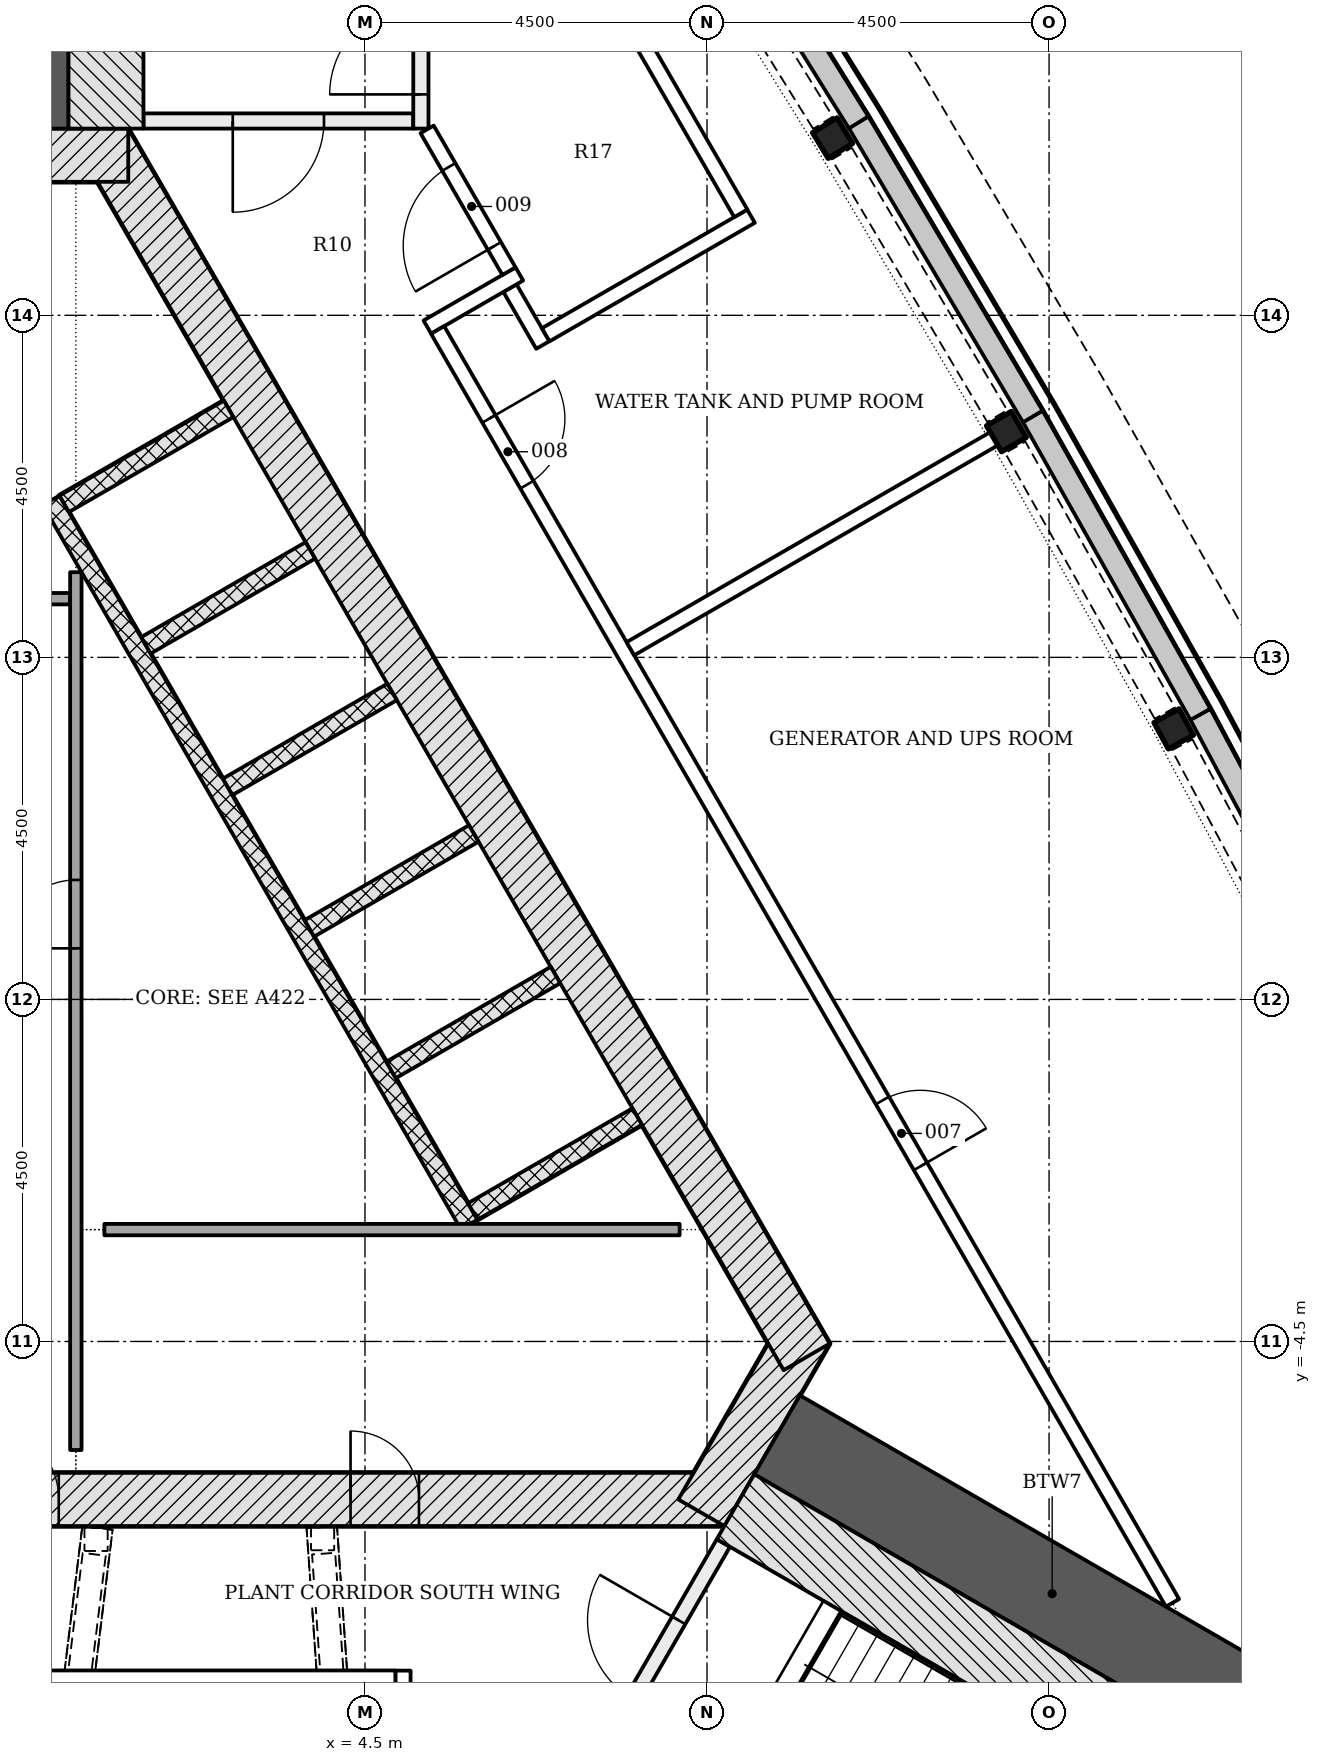
"""IFC4 building model, lengths in metres.
Left out: names, types, materials, properties, quantities, classifications, styles, units other than length and angle.
Written with IfcOpenShell. Run it as: python <this file> out.ifc"""

import sys

from ifc_helpers import new_model, si_unit, direction, frame, frame_2d, origin, origin_2d, place, context, subcontext, project, spatial, polyline, rectangle, i_section, outline, extrude, element, fill, save


model = new_model("IFC4")
c1 = context("Model", 3, precision=1e-05, world=origin(), true_north=direction((0.0, 1.0)))
c2 = subcontext(c1, "Body", "Model", "MODEL_VIEW")
j1 = project(units=[si_unit("LENGTHUNIT", "METRE"), si_unit("PLANEANGLEUNIT", "RADIAN")], contexts=[c1])
p1 = place(None, origin())
s1 = spatial("IfcSite", under=j1, at=p1, CompositionType="ELEMENT")
p2 = place(p1, origin())
s2 = spatial("IfcBuilding", under=s1, at=p2, CompositionType="ELEMENT")
p3 = place(p2, frame((0.0, 0.0, 210.3)))
s3 = spatial("IfcBuildingStorey", under=s2, at=p3, CompositionType="ELEMENT", Elevation=210.3)
p4 = place(p3, frame((-9.229, -6.578, -0.3), z_axis=(0.0, 0.0, 1.0), x_axis=(1.0, 0.0, 0.0)))
e1 = element("IfcWall", 1, at=p4, inside=s3, PredefinedType="SHEAR", context=c2, shape_type="SweptSolid", body=[
    extrude(rectangle(XDim=18.458, YDim=0.7, at=frame_2d((9.229, 0.0))), origin(), (0.0, 0.0, 1.0), 4.6),
])
p5 = place(p4, frame((8.7, 0.0, 0.3)))
e2 = element("IfcOpeningElement", 2, at=p5, cuts=e1, PredefinedType="OPENING", context=c2, shape_type="SweptSolid", body=[
    extrude(rectangle(XDim=1.0, YDim=2.1, at=frame_2d((0.5, 1.05))), frame((0.0, 0.36, 0.0), z_axis=(0.0, -1.0, 0.0), x_axis=(1.0, 0.0, 0.0)), (0.0, 0.0, 1.0), 0.72),
])
p6 = place(p4, frame((3.99, 0.0, 0.3)))
e3 = element("IfcOpeningElement", 3, at=p6, cuts=e1, PredefinedType="OPENING", context=c2, shape_type="SweptSolid", body=[
    extrude(rectangle(XDim=0.9, YDim=2.1, at=frame_2d((0.45, 1.05))), frame((0.0, 0.36, 0.0), z_axis=(0.0, -1.0, 0.0), x_axis=(1.0, 0.0, 0.0)), (0.0, 0.0, 1.0), 0.72),
])
p7 = place(p4, frame((13.539, 0.0, 0.3)))
e4 = element("IfcOpeningElement", 4, at=p7, cuts=e1, PredefinedType="OPENING", context=c2, shape_type="SweptSolid", body=[
    extrude(rectangle(XDim=0.9, YDim=2.1, at=frame_2d((0.45, 1.05))), frame((0.0, 0.36, 0.0), z_axis=(0.0, -1.0, 0.0), x_axis=(1.0, 0.0, 0.0)), (0.0, 0.0, 1.0), 0.72),
])
p8 = place(p3, frame((8.926, -6.753, -0.3), z_axis=(0.0, 0.0, 1.0), x_axis=(0.500042739161, 0.866000726912, 0.0)))
e5 = element("IfcWall", 5, at=p8, inside=s3, PredefinedType="SHEAR", context=c2, shape_type="SweptSolid", body=[
    extrude(rectangle(XDim=2.771, YDim=0.7, at=frame_2d((1.386, 0.0))), origin(), (0.0, 0.0, 1.0), 4.6),
])
p9 = place(p3, frame((10.311, -4.703, -0.3), z_axis=(0.0, 0.0, 1.0), x_axis=(-0.500001446645, 0.866024568562, 0.0)))
e6 = element("IfcWall", 6, at=p9, inside=s3, PredefinedType="SHEAR", context=c2, shape_type="SweptSolid", body=[
    extrude(rectangle(XDim=18.458, YDim=0.7, at=frame_2d((9.229, 0.0))), origin(), (0.0, 0.0, 1.0), 4.6),
])
p10 = place(p3, frame((1.386, 11.106, -0.3), z_axis=(0.0, 0.0, 1.0), x_axis=(-1.0, 0.0, 0.0)))
e7 = element("IfcWall", 7, at=p10, inside=s3, PredefinedType="SHEAR", context=c2, shape_type="SweptSolid", body=[
    extrude(rectangle(XDim=2.771, YDim=0.7, at=frame_2d((1.386, 0.0))), origin(), (0.0, 0.0, 1.0), 4.6),
])
for number, where, z_axis, x_axis in (
    (8, (0.0, 11.456, -0.3), (0.0, 0.0, 1.0), (0.0, 1.0, 0.0)),
    (9, (9.922, -5.728, -0.3), (0.0, 0.0, 1.0), (0.866, -0.5, 0.0)),
):
    element("IfcWall", number, at=place(p3, frame(where, z_axis=z_axis, x_axis=x_axis)), inside=s3, PredefinedType="SHEAR", context=c2, shape_type="SweptSolid", body=[
        extrude(rectangle(XDim=8.359, YDim=1.2, at=frame_2d((4.179, 0.0))), origin(), (0.0, 0.0, 1.0), 4.6),
    ])
for number, where, z_axis, x_axis in (
    (10, (15.14, 3.559, -0.3), (0.0, 0.0, 1.0), (-0.481, 0.877, 0.0)),
    (11, (12.939, 7.47, -0.3), (0.0, 0.0, 1.0), (-0.5, 0.866, 0.0)),
    (12, (10.652, 11.332, -0.3), (0.0, 0.0, 1.0), (-0.519, 0.855, 0.0)),
):
    element("IfcColumn", number, at=place(p3, frame(where, z_axis=z_axis, x_axis=x_axis)), inside=s3, PredefinedType="COLUMN", context=c2, shape_type="SweptSolid", body=[
        extrude(i_section(OverallWidth=0.394, OverallDepth=0.376, WebThickness=0.017, FlangeThickness=0.028, FilletRadius=0.015, at=origin_2d()), origin(), (0.0, 0.0, 1.0), 4.6),
    ])
p11 = place(p3, origin())
e13 = element("IfcWall", 13, at=p11, inside=s3, PredefinedType="NOTDEFINED", context=c2, shape_type="SweptSolid", body=[
    extrude(outline(polyline([(17.741, -0.146), (15.622, 3.823), (15.357, 3.682), (17.477, -0.287), (17.741, -0.146)])), origin(), (0.0, 0.0, 1.0), 1.2),
])
p12 = place(p3, origin())
e14 = element("IfcWall", 14, at=p12, inside=s3, PredefinedType="NOTDEFINED", context=c2, shape_type="SweptSolid", body=[
    extrude(outline(polyline([(15.622, 3.823), (13.415, 7.745), (13.154, 7.598), (15.36, 3.677), (15.622, 3.823)])), origin(), (0.0, 0.0, 1.0), 1.2),
])
p13 = place(p3, origin())
e15 = element("IfcWall", 15, at=p13, inside=s3, PredefinedType="NOTDEFINED", context=c2, shape_type="SweptSolid", body=[
    extrude(outline(polyline([(13.415, 7.745), (11.122, 11.617), (10.864, 11.464), (13.157, 7.592), (13.415, 7.745)])), origin(), (0.0, 0.0, 1.0), 1.2),
])
p14 = place(p3, origin())
e16 = element("IfcWall", 16, at=p14, inside=s3, PredefinedType="NOTDEFINED", context=c2, shape_type="SweptSolid", body=[
    extrude(outline(polyline([(11.122, 11.617), (8.744, 15.437), (8.49, 15.279), (10.867, 11.458), (11.122, 11.617)])), origin(), (0.0, 0.0, 1.0), 1.2),
])
p15 = place(p3, origin())
e17 = element("IfcWall", 17, at=p15, inside=s3, PredefinedType="NOTDEFINED", context=c2, shape_type="SweptSolid", body=[
    extrude(outline(polyline([(13.49, -15.042), (15.507, -14.898), (16.988, -14.602), (18.354, -13.958), (19.526, -13.004), (20.434, -11.797), (21.025, -10.408), (21.265, -8.917), (21.139, -7.411), (20.656, -5.98), (19.772, -4.162), (19.502, -4.293), (20.378, -6.094), (20.844, -7.473), (20.963, -8.905), (20.735, -10.324), (20.172, -11.646), (19.308, -12.795), (18.193, -13.702), (16.893, -14.315), (15.467, -14.6), (13.469, -14.743), (13.49, -15.042)])), origin(), (0.0, 0.0, 1.0), 4.3),
])
for number, where, z_axis, x_axis in (
    (18, (8.081, -1.541, -0.3), (0.0, 0.0, 1.0), (-0.866, -0.5, 0.0)),
    (19, (7.006, 0.321, -0.3), (0.0, 0.0, 1.0), (-0.866, -0.5, 0.0)),
):
    element("IfcWall", number, at=place(p3, frame(where, z_axis=z_axis, x_axis=x_axis)), inside=s3, PredefinedType="PARTITIONING", context=c2, shape_type="SweptSolid", body=[
        extrude(rectangle(XDim=2.5, YDim=0.25, at=frame_2d((1.25, 0.0))), origin(), (0.0, 0.0, 1.0), 4.6),
    ])
p16 = place(p3, frame((5.931, 2.183, -0.3), z_axis=(0.0, 0.0, 1.0), x_axis=(-0.866047370643, -0.499961950354, 0.0)))
e20 = element("IfcWall", 20, at=p16, inside=s3, PredefinedType="PARTITIONING", context=c2, shape_type="SweptSolid", body=[
    extrude(rectangle(XDim=2.5, YDim=0.25, at=frame_2d((1.25, 0.0))), origin(), (0.0, 0.0, 1.0), 4.6),
])
for number, where, z_axis, x_axis in (
    (21, (4.856, 4.045, -0.3), (0.0, 0.0, 1.0), (-0.866, -0.5, 0.0)),
    (22, (3.781, 5.907, -0.3), (0.0, 0.0, 1.0), (-0.866, -0.5, 0.0)),
    (23, (2.706, 7.769, -0.3), (0.0, 0.0, 1.0), (-0.866, -0.5, 0.0)),
):
    element("IfcWall", number, at=place(p3, frame(where, z_axis=z_axis, x_axis=x_axis)), inside=s3, PredefinedType="PARTITIONING", context=c2, shape_type="SweptSolid", body=[
        extrude(rectangle(XDim=2.5, YDim=0.25, at=frame_2d((1.25, 0.0))), origin(), (0.0, 0.0, 1.0), 4.6),
    ])
p17 = place(p3, frame((5.87, -2.961, 0.0), z_axis=(0.0, 0.0, 1.0), x_axis=(-0.50000615651, 0.866021849293, 0.0)))
e24 = element("IfcWall", 24, at=p17, inside=s3, PredefinedType="PARTITIONING", context=c2, shape_type="SweptSolid", body=[
    extrude(rectangle(XDim=11.0, YDim=0.25, at=frame_2d((5.5, 0.0))), origin(), (0.0, 0.0, 1.0), 4.3),
])
p18 = place(p3, frame((-0.679, 5.272, 0.0), z_axis=(0.0, 0.0, 1.0), x_axis=(1.0, 0.0, 0.0)))
e25 = element("IfcWall", 25, at=p18, inside=s3, PredefinedType="PARTITIONING", context=c2, shape_type="SweptSolid", body=[
    extrude(rectangle(XDim=1.3, YDim=0.15, at=frame_2d((0.65, 0.0))), origin(), (0.0, 0.0, 1.0), 4.3),
])
p19 = place(p3, frame((0.696, -5.928, 0.0), z_axis=(0.0, 0.0, 1.0), x_axis=(0.0, 1.0, 0.0)))
e26 = element("IfcWall", 26, at=p19, inside=s3, PredefinedType="PARTITIONING", context=c2, shape_type="SweptSolid", body=[
    extrude(rectangle(XDim=11.549, YDim=0.15, at=frame_2d((5.774, 0.0))), origin(), (0.0, 0.0, 1.0), 4.3),
])
p20 = place(p19, frame((6.6, 0.0, 0.0)))
e27 = element("IfcOpeningElement", 27, at=p20, cuts=e26, PredefinedType="OPENING", context=c2, shape_type="SweptSolid", body=[
    extrude(rectangle(XDim=0.9, YDim=2.1, at=frame_2d((0.45, 1.05))), frame((0.0, 0.085, 0.0), z_axis=(0.0, -1.0, 0.0), x_axis=(1.0, 0.0, 0.0)), (0.0, 0.0, 1.0), 0.17),
])
p21 = place(p3, frame((1.071, -3.028, 0.0), z_axis=(0.0, 0.0, 1.0), x_axis=(1.0, 0.0, 0.0)))
e28 = element("IfcWall", 28, at=p21, inside=s3, PredefinedType="PARTITIONING", context=c2, shape_type="SweptSolid", body=[
    extrude(rectangle(XDim=7.569, YDim=0.15, at=frame_2d((3.784, 0.0))), origin(), (0.0, 0.0, 1.0), 4.3),
])
p22 = place(p3, frame((5.135, 11.556, -0.3), z_axis=(0.0, 0.0, 1.0), x_axis=(-1.0, 0.0, 0.0)))
e29 = element("IfcWall", 29, at=p22, inside=s3, PredefinedType="SHEAR", context=c2, shape_type="SweptSolid", body=[
    extrude(rectangle(XDim=3.55, YDim=0.2, at=frame_2d((1.775, 0.0))), origin(), (0.0, 0.0, 1.0), 4.6),
])
p23 = place(p22, frame((1.175, 0.0, 0.3)))
e30 = element("IfcOpeningElement", 30, at=p23, cuts=e29, PredefinedType="OPENING", context=c2, shape_type="SweptSolid", body=[
    extrude(rectangle(XDim=1.2, YDim=2.1, at=frame_2d((0.6, 1.05))), frame((0.0, 0.11, 0.0), z_axis=(0.0, -1.0, 0.0), x_axis=(1.0, 0.0, 0.0)), (0.0, 0.0, 1.0), 0.22),
])
p24 = place(p3, frame((5.236, 11.456, -0.3), z_axis=(0.0, 0.0, 1.0), x_axis=(0.0, 1.0, 0.0)))
e31 = element("IfcWall", 31, at=p24, inside=s3, PredefinedType="SHEAR", context=c2, shape_type="SweptSolid", body=[
    extrude(rectangle(XDim=5.6, YDim=0.2, at=frame_2d((2.8, 0.0))), origin(), (0.0, 0.0, 1.0), 4.6),
])
p25 = place(p24, frame((0.45, 0.0, 0.3)))
e32 = element("IfcOpeningElement", 32, at=p25, cuts=e31, PredefinedType="OPENING", context=c2, shape_type="SweptSolid", body=[
    extrude(rectangle(XDim=1.2, YDim=2.1, at=frame_2d((0.6, 1.05))), frame((0.0, 0.11, 0.0), z_axis=(0.0, -1.0, 0.0), x_axis=(1.0, 0.0, 0.0)), (0.0, 0.0, 1.0), 0.22),
])
p26 = place(p3, frame((1.093, 11.456, -0.3), z_axis=(0.0, 0.0, 1.0), x_axis=(0.0, 1.0, 0.0)))
e33 = element("IfcWall", 33, at=p26, inside=s3, PredefinedType="SHEAR", context=c2, shape_type="SweptSolid", body=[
    extrude(rectangle(XDim=7.2, YDim=0.986, at=frame_2d((3.6, 0.0))), origin(), (0.0, 0.0, 1.0), 4.6),
])
p27 = place(p3, frame((7.44, -10.226, -0.3), z_axis=(0.0, 0.0, 1.0), x_axis=(0.500022077904, 0.866012656725, 0.0)))
e34 = element("IfcWall", 34, at=p27, inside=s3, PredefinedType="SHEAR", context=c2, shape_type="SweptSolid", body=[
    extrude(rectangle(XDim=3.55, YDim=0.2, at=frame_2d((1.775, 0.0))), origin(), (0.0, 0.0, 1.0), 4.6),
])
p28 = place(p27, frame((1.175, 0.0, 0.3)))
e35 = element("IfcOpeningElement", 35, at=p28, cuts=e34, PredefinedType="OPENING", context=c2, shape_type="SweptSolid", body=[
    extrude(rectangle(XDim=1.2, YDim=2.1, at=frame_2d((0.6, 1.05))), frame((0.0, 0.11, 0.0), z_axis=(0.0, -1.0, 0.0), x_axis=(1.0, 0.0, 0.0)), (0.0, 0.0, 1.0), 0.22),
])
p29 = place(p3, frame((9.375, -6.675, -0.3), z_axis=(0.0, 0.0, 1.0), x_axis=(0.866026919366, -0.499997374926, 0.0)))
e36 = element("IfcWall", 36, at=p29, inside=s3, PredefinedType="SHEAR", context=c2, shape_type="SweptSolid", body=[
    extrude(rectangle(XDim=7.2, YDim=0.986, at=frame_2d((3.6, 0.0))), origin(), (0.0, 0.0, 1.0), 4.6),
])
p30 = place(p3, frame((5.0, -10.428, 0.0), z_axis=(0.0, 0.0, 1.0), x_axis=(0.0, 1.0, 0.0)))
e37 = element("IfcWall", 37, at=p30, inside=s3, PredefinedType="PARTITIONING", context=c2, shape_type="SweptSolid", body=[
    extrude(rectangle(XDim=1.598, YDim=0.2, at=frame_2d((0.799, 0.0))), origin(), (0.0, 0.0, 1.0), 4.3),
])
p31 = place(p3, frame((-14.091, -8.928, 0.0), z_axis=(0.0, 0.0, 1.0), x_axis=(1.0, 0.0, 0.0)))
e38 = element("IfcWall", 38, at=p31, inside=s3, PredefinedType="PARTITIONING", context=c2, shape_type="SweptSolid", body=[
    extrude(rectangle(XDim=18.991, YDim=0.2, at=frame_2d((9.495, 0.0))), origin(), (0.0, 0.0, 1.0), 4.3),
])
p32 = place(p31, frame((10.411, 0.0, 0.0)))
e39 = element("IfcOpeningElement", 39, at=p32, cuts=e38, PredefinedType="OPENING", context=c2, shape_type="SweptSolid", body=[
    extrude(rectangle(XDim=1.0, YDim=2.1, at=frame_2d((0.5, 1.05))), frame((0.0, 0.11, 0.0), z_axis=(0.0, -1.0, 0.0), x_axis=(1.0, 0.0, 0.0)), (0.0, 0.0, 1.0), 0.22),
])
p33 = place(p3, frame((6.408, 9.358, 0.0), z_axis=(0.0, 0.0, 1.0), x_axis=(0.49996696679, -0.866044474677, 0.0)))
e40 = element("IfcWall", 40, at=p33, inside=s3, PredefinedType="PARTITIONING", context=c2, shape_type="SweptSolid", body=[
    extrude(rectangle(XDim=0.864, YDim=0.2, at=frame_2d((0.432, 0.0))), origin(), (0.0, 0.0, 1.0), 3.752),
])
p34 = place(p3, frame((5.32, 8.845, 0.0), z_axis=(0.0, 0.0, 1.0), x_axis=(0.866031452229, 0.49998952364, 0.0)))
e41 = element("IfcWall", 41, at=p34, inside=s3, PredefinedType="PARTITIONING", context=c2, shape_type="SweptSolid", body=[
    extrude(rectangle(XDim=1.398, YDim=0.2, at=frame_2d((0.699, 0.0))), origin(), (0.0, 0.0, 1.0), 4.3),
])
p35 = place(p3, frame((6.395, 9.581, 0.0), z_axis=(0.0, 0.0, 1.0), x_axis=(-0.500003735859, 0.866023246874, 0.0)))
e42 = element("IfcWall", 42, at=p35, inside=s3, PredefinedType="PARTITIONING", context=c2, shape_type="SweptSolid", body=[
    extrude(rectangle(XDim=2.154, YDim=0.2, at=frame_2d((1.077, 0.0))), origin(), (0.0, 0.0, 1.0), 4.3),
])
p36 = place(p35, frame((0.383, 0.0, 0.0)))
e43 = element("IfcOpeningElement", 43, at=p36, cuts=e42, PredefinedType="OPENING", context=c2, shape_type="SweptSolid", body=[
    extrude(rectangle(XDim=1.2, YDim=2.1, at=frame_2d((0.6, 1.05))), frame((0.0, 0.11, 0.0), z_axis=(0.0, -1.0, 0.0), x_axis=(1.0, 0.0, 0.0)), (0.0, 0.0, 1.0), 0.22),
])
p37 = place(p3, frame((5.455, 8.808, 0.0), z_axis=(0.0, 0.0, 1.0), x_axis=(0.49999276215, -0.866029582519, 0.0)))
e44 = element("IfcWall", 44, at=p37, inside=s3, PredefinedType="PARTITIONING", context=c2, shape_type="SweptSolid", body=[
    extrude(rectangle(XDim=19.337, YDim=0.2, at=frame_2d((9.668, 0.0))), origin(), (0.0, 0.0, 1.0), 3.752),
])
p38 = place(p37, frame((11.705, 0.0, 0.0)))
e45 = element("IfcOpeningElement", 45, at=p38, cuts=e44, PredefinedType="OPENING", context=c2, shape_type="SweptSolid", body=[
    extrude(rectangle(XDim=1.0, YDim=2.1, at=frame_2d((0.5, 1.05))), frame((0.0, 0.11, 0.0), z_axis=(0.0, -1.0, 0.0), x_axis=(1.0, 0.0, 0.0)), (0.0, 0.0, 1.0), 0.22),
])
p39 = place(p37, frame((1.351, 0.0, 0.0)))
e46 = element("IfcOpeningElement", 46, at=p39, cuts=e44, PredefinedType="OPENING", context=c2, shape_type="SweptSolid", body=[
    extrude(rectangle(XDim=1.0, YDim=2.1, at=frame_2d((0.5, 1.05))), frame((0.0, 0.11, 0.0), z_axis=(0.0, -1.0, 0.0), x_axis=(1.0, 0.0, 0.0)), (0.0, 0.0, 1.0), 0.22),
])
p40 = place(p3, frame((7.992, 4.614, 0.0), z_axis=(0.0, 0.0, 1.0), x_axis=(0.866008693241, 0.500028942393, 0.0)))
e47 = element("IfcWall", 47, at=p40, inside=s3, PredefinedType="PARTITIONING", context=c2, shape_type="SweptSolid", body=[
    extrude(rectangle(XDim=5.562, YDim=0.2, at=frame_2d((2.781, 0.0))), origin(), (0.0, 0.0, 1.0), 3.752),
])
p41 = place(p3, frame((6.878, 8.744, 0.0), z_axis=(0.0, 0.0, 1.0), x_axis=(0.866023983177, 0.500002460556, 0.0)))
e48 = element("IfcWall", 48, at=p41, inside=s3, PredefinedType="PARTITIONING", context=c2, shape_type="SweptSolid", body=[
    extrude(rectangle(XDim=3.12, YDim=0.2, at=frame_2d((1.56, 0.0))), origin(), (0.0, 0.0, 1.0), 4.3),
])
p42 = place(p3, frame((6.566, 15.327, 0.0), z_axis=(0.0, 0.0, 1.0), x_axis=(0.499997778408, -0.866026686418, 0.0)))
e49 = element("IfcWall", 49, at=p42, inside=s3, PredefinedType="PARTITIONING", context=c2, shape_type="SweptSolid", body=[
    extrude(rectangle(XDim=5.757, YDim=0.2, at=frame_2d((2.878, 0.0))), origin(), (0.0, 0.0, 1.0), 3.752),
])
p43 = place(p5, origin())
e50 = element("IfcDoor", 50, at=p43, inside=s3, OperationType="SINGLE_SWING_LEFT", PredefinedType="DOOR", context=c2, shape_type="SweptSolid", body=[
    extrude(rectangle(XDim=1.0, YDim=2.1, at=frame_2d((0.5, 1.05))), frame((0.0, 0.075, 0.0), z_axis=(0.0, -1.0, 0.0), x_axis=(1.0, 0.0, 0.0)), (0.0, 0.0, 1.0), 0.15),
])
fill(e2, e50)
p44 = place(p7, origin())
e51 = element("IfcDoor", 51, at=p44, inside=s3, OperationType="SINGLE_SWING_LEFT", PredefinedType="DOOR", context=c2, shape_type="SweptSolid", body=[
    extrude(rectangle(XDim=0.9, YDim=2.1, at=frame_2d((0.45, 1.05))), frame((0.0, 0.075, 0.0), z_axis=(0.0, -1.0, 0.0), x_axis=(1.0, 0.0, 0.0)), (0.0, 0.0, 1.0), 0.15),
])
fill(e4, e51)
p45 = place(p20, origin())
e52 = element("IfcDoor", 52, at=p45, inside=s3, OperationType="SINGLE_SWING_LEFT", PredefinedType="DOOR", context=c2, shape_type="SweptSolid", body=[
    extrude(rectangle(XDim=0.9, YDim=2.1, at=frame_2d((0.45, 1.05))), frame((0.0, 0.025, 0.0), z_axis=(0.0, -1.0, 0.0), x_axis=(1.0, 0.0, 0.0)), (0.0, 0.0, 1.0), 0.05),
])
fill(e27, e52)
p46 = place(p23, origin())
e53 = element("IfcDoor", 53, at=p46, inside=s3, OperationType="SINGLE_SWING_RIGHT", PredefinedType="DOOR", context=c2, shape_type="SweptSolid", body=[
    extrude(rectangle(XDim=1.2, YDim=2.1, at=frame_2d((0.6, 1.05))), frame((0.0, 0.025, 0.0), z_axis=(0.0, -1.0, 0.0), x_axis=(1.0, 0.0, 0.0)), (0.0, 0.0, 1.0), 0.05),
])
fill(e30, e53)
p47 = place(p25, origin())
e54 = element("IfcDoor", 54, at=p47, inside=s3, OperationType="SINGLE_SWING_LEFT", PredefinedType="DOOR", context=c2, shape_type="SweptSolid", body=[
    extrude(rectangle(XDim=1.2, YDim=2.1, at=frame_2d((0.6, 1.05))), frame((0.0, 0.025, 0.0), z_axis=(0.0, -1.0, 0.0), x_axis=(1.0, 0.0, 0.0)), (0.0, 0.0, 1.0), 0.05),
])
fill(e32, e54)
p48 = place(p28, origin())
e55 = element("IfcDoor", 55, at=p48, inside=s3, OperationType="SINGLE_SWING_RIGHT", PredefinedType="DOOR", context=c2, shape_type="SweptSolid", body=[
    extrude(rectangle(XDim=1.2, YDim=2.1, at=frame_2d((0.6, 1.05))), frame((0.0, 0.025, 0.0), z_axis=(0.0, -1.0, 0.0), x_axis=(1.0, 0.0, 0.0)), (0.0, 0.0, 1.0), 0.05),
])
fill(e35, e55)
p49 = place(p38, origin())
e56 = element("IfcDoor", 56, at=p49, inside=s3, OperationType="SINGLE_SWING_RIGHT", PredefinedType="DOOR", context=c2, shape_type="SweptSolid", body=[
    extrude(rectangle(XDim=1.0, YDim=2.1, at=frame_2d((0.5, 1.05))), frame((0.0, 0.025, 0.0), z_axis=(0.0, -1.0, 0.0), x_axis=(1.0, 0.0, 0.0)), (0.0, 0.0, 1.0), 0.05),
])
fill(e45, e56)
p50 = place(p39, origin())
e57 = element("IfcDoor", 57, at=p50, inside=s3, OperationType="SINGLE_SWING_LEFT", PredefinedType="DOOR", context=c2, shape_type="SweptSolid", body=[
    extrude(rectangle(XDim=1.0, YDim=2.1, at=frame_2d((0.5, 1.05))), frame((0.0, 0.025, 0.0), z_axis=(0.0, -1.0, 0.0), x_axis=(1.0, 0.0, 0.0)), (0.0, 0.0, 1.0), 0.05),
])
fill(e46, e57)
p51 = place(p36, origin())
e58 = element("IfcDoor", 58, at=p51, inside=s3, OperationType="SINGLE_SWING_LEFT", PredefinedType="DOOR", context=c2, shape_type="SweptSolid", body=[
    extrude(rectangle(XDim=1.2, YDim=2.1, at=frame_2d((0.6, 1.05))), frame((0.0, 0.025, 0.0), z_axis=(0.0, -1.0, 0.0), x_axis=(1.0, 0.0, 0.0)), (0.0, 0.0, 1.0), 0.05),
])
fill(e43, e58)
save(model, sys.argv[1])
